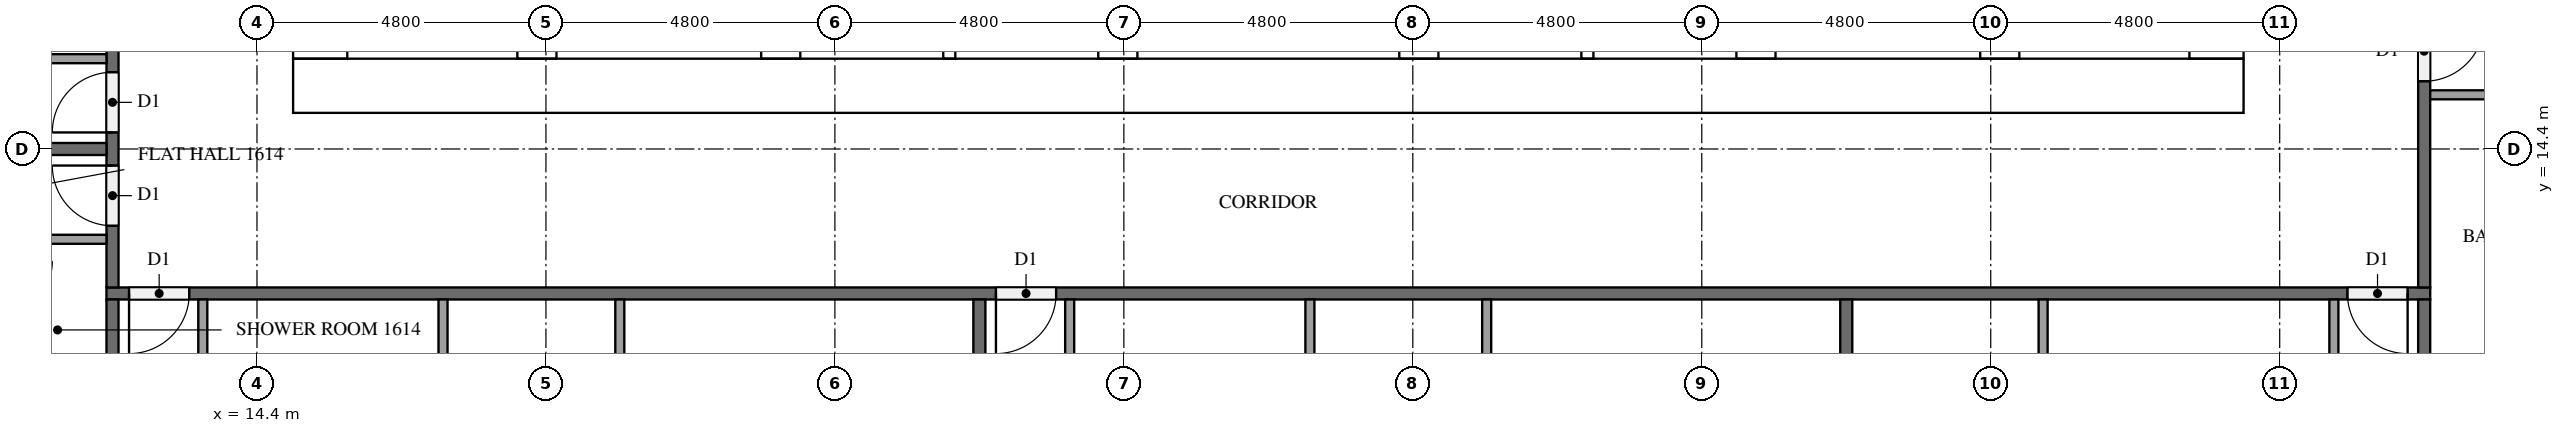
"""IFC4 building model, lengths in metres.
Left out: names, types, materials, properties, quantities, classifications, styles, units other than length and angle.
Written with IfcOpenShell. Run it as: python <this file> out.ifc"""

import sys

from ifc_helpers import new_model, si_unit, direction, frame, frame_2d, origin, place, context, subcontext, project, spatial, rectangle, extrude, element, fill, save


model = new_model("IFC4")
c1 = context("Model", 3, precision=1e-05, world=origin(), true_north=direction((0.0, 1.0)))
c2 = subcontext(c1, "Body", "Model", "MODEL_VIEW")
j1 = project(units=[si_unit("LENGTHUNIT", "METRE"), si_unit("PLANEANGLEUNIT", "RADIAN")], contexts=[c1])
p1 = place(None, origin())
s1 = spatial("IfcSite", under=j1, at=p1, CompositionType="ELEMENT")
p2 = place(p1, origin())
s2 = spatial("IfcBuilding", under=s1, at=p2, CompositionType="ELEMENT")
p3 = place(p2, frame((0.0, 0.0, 66.3)))
s3 = spatial("IfcBuildingStorey", under=s2, at=p3, CompositionType="ELEMENT", Elevation=66.3)
p4 = place(p3, frame((15.0, 15.45, 0.0), z_axis=(0.0, 0.0, 1.0), x_axis=(1.0, 0.0, 0.0)))
e1 = element("IfcWall", 1, at=p4, inside=s3, PredefinedType="SHEAR", context=c2, shape_type="SweptSolid", body=[
    extrude(rectangle(XDim=32.4, YDim=0.9, at=frame_2d((16.2, 0.0))), origin(), (0.0, 0.0, 1.0), 3.2),
])
p5 = place(p4, frame((15.3, 0.0, 0.0)))
e2 = element("IfcOpeningElement", 2, at=p5, cuts=e1, PredefinedType="OPENING", context=c2, shape_type="SweptSolid", body=[
    extrude(rectangle(XDim=1.8, YDim=2.1, at=frame_2d((0.9, 1.05))), frame((0.0, 0.46, 0.0), z_axis=(0.0, -1.0, 0.0), x_axis=(1.0, 0.0, 0.0)), (0.0, 0.0, 1.0), 0.92),
])
p6 = place(p3, frame((15.45, 15.9, 0.0), z_axis=(0.0, 0.0, 1.0), x_axis=(0.0, 1.0, 0.0)))
e3 = element("IfcWall", 3, at=p6, inside=s3, PredefinedType="SHEAR", context=c2, shape_type="SweptSolid", body=[
    extrude(rectangle(XDim=21.0, YDim=0.9, at=frame_2d((10.5, 0.0))), origin(), (0.0, 0.0, 1.0), 3.2),
])
p7 = place(p6, frame((4.86, 0.0, 0.0)))
e4 = element("IfcOpeningElement", 4, at=p7, cuts=e3, PredefinedType="OPENING", context=c2, shape_type="SweptSolid", body=[
    extrude(rectangle(XDim=1.2, YDim=2.1, at=frame_2d((0.6, 1.05))), frame((0.0, 0.46, 0.0), z_axis=(0.0, -1.0, 0.0), x_axis=(1.0, 0.0, 0.0)), (0.0, 0.0, 1.0), 0.92),
])
p8 = place(p3, frame((46.95, 15.9, 0.0), z_axis=(0.0, 0.0, 1.0), x_axis=(0.0, 1.0, 0.0)))
e5 = element("IfcWall", 5, at=p8, inside=s3, PredefinedType="SHEAR", context=c2, shape_type="SweptSolid", body=[
    extrude(rectangle(XDim=21.0, YDim=0.9, at=frame_2d((10.5, 0.0))), origin(), (0.0, 0.0, 1.0), 3.2),
])
p9 = place(p8, frame((10.2, 0.0, 0.0)))
e6 = element("IfcOpeningElement", 6, at=p9, cuts=e5, PredefinedType="OPENING", context=c2, shape_type="SweptSolid", body=[
    extrude(rectangle(XDim=1.2, YDim=2.1, at=frame_2d((0.6, 1.05))), frame((0.0, 0.46, 0.0), z_axis=(0.0, -1.0, 0.0), x_axis=(1.0, 0.0, 0.0)), (0.0, 0.0, 1.0), 0.92),
])
p10 = place(p3, frame((19.05, 15.9, 0.0), z_axis=(0.0, 0.0, 1.0), x_axis=(0.0, 1.0, 0.0)))
e7 = element("IfcWall", 7, at=p10, inside=s3, PredefinedType="SHEAR", context=c2, shape_type="SweptSolid", body=[
    extrude(rectangle(XDim=15.025, YDim=0.65, at=frame_2d((7.513, 0.0))), origin(), (0.0, 0.0, 1.0), 3.2),
])
p11 = place(p10, frame((9.55, 0.0, 0.0)))
e8 = element("IfcOpeningElement", 8, at=p11, cuts=e7, PredefinedType="OPENING", context=c2, shape_type="SweptSolid", body=[
    extrude(rectangle(XDim=1.1, YDim=2.1, at=frame_2d((0.55, 1.05))), frame((0.0, 0.335, 0.0), z_axis=(0.0, -1.0, 0.0), x_axis=(1.0, 0.0, 0.0)), (0.0, 0.0, 1.0), 0.67),
])
p12 = place(p10, frame((13.05, 0.0, 0.0)))
e9 = element("IfcOpeningElement", 9, at=p12, cuts=e7, PredefinedType="OPENING", context=c2, shape_type="SweptSolid", body=[
    extrude(rectangle(XDim=1.1, YDim=2.1, at=frame_2d((0.55, 1.05))), frame((0.0, 0.335, 0.0), z_axis=(0.0, -1.0, 0.0), x_axis=(1.0, 0.0, 0.0)), (0.0, 0.0, 1.0), 0.67),
])
p13 = place(p10, frame((0.3, 0.0, 0.0)))
e10 = element("IfcOpeningElement", 10, at=p13, cuts=e7, PredefinedType="OPENING", context=c2, shape_type="SweptSolid", body=[
    extrude(rectangle(XDim=1.2, YDim=2.1, at=frame_2d((0.6, 1.05))), frame((0.0, 0.335, 0.0), z_axis=(0.0, -1.0, 0.0), x_axis=(1.0, 0.0, 0.0)), (0.0, 0.0, 1.0), 0.67),
])
p14 = place(p3, frame((23.1, 15.9, 0.0), z_axis=(0.0, 0.0, 1.0), x_axis=(0.0, 1.0, 0.0)))
e11 = element("IfcWall", 11, at=p14, inside=s3, PredefinedType="SHEAR", context=c2, shape_type="SweptSolid", body=[
    extrude(rectangle(XDim=21.0, YDim=0.65, at=frame_2d((10.5, 0.0))), origin(), (0.0, 0.0, 1.0), 3.2),
])
p15 = place(p3, frame((39.3, 15.9, 0.0), z_axis=(0.0, 0.0, 1.0), x_axis=(0.0, 1.0, 0.0)))
e12 = element("IfcWall", 12, at=p15, inside=s3, PredefinedType="SHEAR", context=c2, shape_type="SweptSolid", body=[
    extrude(rectangle(XDim=8.35, YDim=0.65, at=frame_2d((4.175, 0.0))), origin(), (0.0, 0.0, 1.0), 3.2),
])
p16 = place(p3, frame((43.35, 15.9, 0.0), z_axis=(0.0, 0.0, 1.0), x_axis=(0.0, 1.0, 0.0)))
e13 = element("IfcWall", 13, at=p16, inside=s3, PredefinedType="SHEAR", context=c2, shape_type="SweptSolid", body=[
    extrude(rectangle(XDim=8.35, YDim=0.65, at=frame_2d((4.175, 0.0))), origin(), (0.0, 0.0, 1.0), 3.2),
])
p17 = place(p16, frame((0.3, 0.0, 0.0)))
e14 = element("IfcOpeningElement", 14, at=p17, cuts=e13, PredefinedType="OPENING", context=c2, shape_type="SweptSolid", body=[
    extrude(rectangle(XDim=1.2, YDim=2.1, at=frame_2d((0.6, 1.05))), frame((0.0, 0.335, 0.0), z_axis=(0.0, -1.0, 0.0), x_axis=(1.0, 0.0, 0.0)), (0.0, 0.0, 1.0), 0.67),
])
for number, where, z_axis, x_axis in (
    (15, (28.7, 15.9, 0.0), (0.0, 0.0, 1.0), (0.0, 1.0, 0.0)),
    (16, (33.7, 15.9, 0.0), (0.0, 0.0, 1.0), (0.0, 1.0, 0.0)),
):
    element("IfcWall", number, at=place(p3, frame(where, z_axis=z_axis, x_axis=x_axis)), inside=s3, PredefinedType="SHEAR", context=c2, shape_type="SweptSolid", body=[
        extrude(rectangle(XDim=2.525, YDim=0.65, at=frame_2d((1.263, 0.0))), origin(), (0.0, 0.0, 1.0), 3.2),
    ])
for number, where, z_axis, x_axis in (
    (17, (25.9, 15.9, 0.0), (0.0, 0.0, 1.0), (0.0, 1.0, 0.0)),
    (18, (36.5, 15.9, 0.0), (0.0, 0.0, 1.0), (0.0, 1.0, 0.0)),
):
    element("IfcWall", number, at=place(p3, frame(where, z_axis=z_axis, x_axis=x_axis)), inside=s3, PredefinedType="SOLIDWALL", context=c2, shape_type="SweptSolid", body=[
        extrude(rectangle(XDim=2.525, YDim=0.2, at=frame_2d((1.263, 0.0))), origin(), (0.0, 0.0, 1.0), 3.2),
    ])
p18 = place(p3, frame((50.5, 12.0, 0.0), z_axis=(0.0, 0.0, 1.0), x_axis=(-1.0, 0.0, 0.0)))
e19 = element("IfcWall", 19, at=p18, inside=s3, PredefinedType="PARTITIONING", context=c2, shape_type="SweptSolid", body=[
    extrude(rectangle(XDim=38.6, YDim=0.2, at=frame_2d((19.3, 0.0))), origin(), (0.0, 0.0, 1.0), 3.2),
])
p19 = place(p18, frame((37.225, 0.0, 0.0)))
e20 = element("IfcOpeningElement", 20, at=p19, cuts=e19, PredefinedType="OPENING", context=c2, shape_type="SweptSolid", body=[
    extrude(rectangle(XDim=1.0, YDim=2.1, at=frame_2d((0.5, 1.05))), frame((0.0, 0.11, 0.0), z_axis=(0.0, -1.0, 0.0), x_axis=(1.0, 0.0, 0.0)), (0.0, 0.0, 1.0), 0.22),
])
p20 = place(p18, frame((22.825, 0.0, 0.0)))
e21 = element("IfcOpeningElement", 21, at=p20, cuts=e19, PredefinedType="OPENING", context=c2, shape_type="SweptSolid", body=[
    extrude(rectangle(XDim=1.0, YDim=2.1, at=frame_2d((0.5, 1.05))), frame((0.0, 0.11, 0.0), z_axis=(0.0, -1.0, 0.0), x_axis=(1.0, 0.0, 0.0)), (0.0, 0.0, 1.0), 0.22),
])
p21 = place(p18, frame((0.375, 0.0, 0.0)))
e22 = element("IfcOpeningElement", 22, at=p21, cuts=e19, PredefinedType="OPENING", context=c2, shape_type="SweptSolid", body=[
    extrude(rectangle(XDim=1.0, YDim=2.1, at=frame_2d((0.5, 1.05))), frame((0.0, 0.11, 0.0), z_axis=(0.0, -1.0, 0.0), x_axis=(1.0, 0.0, 0.0)), (0.0, 0.0, 1.0), 0.22),
])
p22 = place(p3, frame((50.4, 40.7, 0.0), z_axis=(0.0, 0.0, 1.0), x_axis=(0.0, -1.0, 0.0)))
e23 = element("IfcWall", 23, at=p22, inside=s3, PredefinedType="PARTITIONING", context=c2, shape_type="SweptSolid", body=[
    extrude(rectangle(XDim=28.6, YDim=0.2, at=frame_2d((14.3, 0.0))), origin(), (0.0, 0.0, 1.0), 3.2),
])
p23 = place(p22, frame((24.175, 0.0, 0.0)))
e24 = element("IfcOpeningElement", 24, at=p23, cuts=e23, PredefinedType="OPENING", context=c2, shape_type="SweptSolid", body=[
    extrude(rectangle(XDim=1.0, YDim=2.1, at=frame_2d((0.5, 1.05))), frame((0.0, 0.11, 0.0), z_axis=(0.0, -1.0, 0.0), x_axis=(1.0, 0.0, 0.0)), (0.0, 0.0, 1.0), 0.22),
])
p24 = place(p22, frame((22.625, 0.0, 0.0)))
e25 = element("IfcOpeningElement", 25, at=p24, cuts=e23, PredefinedType="OPENING", context=c2, shape_type="SweptSolid", body=[
    extrude(rectangle(XDim=1.0, YDim=2.1, at=frame_2d((0.5, 1.05))), frame((0.0, 0.11, 0.0), z_axis=(0.0, -1.0, 0.0), x_axis=(1.0, 0.0, 0.0)), (0.0, 0.0, 1.0), 0.22),
])
p25 = place(p22, frame((10.625, 0.0, 0.0)))
e26 = element("IfcOpeningElement", 26, at=p25, cuts=e23, PredefinedType="OPENING", context=c2, shape_type="SweptSolid", body=[
    extrude(rectangle(XDim=1.0, YDim=2.1, at=frame_2d((0.5, 1.05))), frame((0.0, 0.11, 0.0), z_axis=(0.0, -1.0, 0.0), x_axis=(1.0, 0.0, 0.0)), (0.0, 0.0, 1.0), 0.22),
])
p26 = place(p3, frame((12.0, 12.1, 0.0), z_axis=(0.0, 0.0, 1.0), x_axis=(0.0, 1.0, 0.0)))
e27 = element("IfcWall", 27, at=p26, inside=s3, PredefinedType="PARTITIONING", context=c2, shape_type="SweptSolid", body=[
    extrude(rectangle(XDim=28.6, YDim=0.2, at=frame_2d((14.3, 0.0))), origin(), (0.0, 0.0, 1.0), 3.2),
])
p27 = place(p26, frame((19.375, 0.0, 0.0)))
e28 = element("IfcOpeningElement", 28, at=p27, cuts=e27, PredefinedType="OPENING", context=c2, shape_type="SweptSolid", body=[
    extrude(rectangle(XDim=1.0, YDim=2.1, at=frame_2d((0.5, 1.05))), frame((0.0, 0.11, 0.0), z_axis=(0.0, -1.0, 0.0), x_axis=(1.0, 0.0, 0.0)), (0.0, 0.0, 1.0), 0.22),
])
p28 = place(p26, frame((12.175, 0.0, 0.0)))
e29 = element("IfcOpeningElement", 29, at=p28, cuts=e27, PredefinedType="OPENING", context=c2, shape_type="SweptSolid", body=[
    extrude(rectangle(XDim=1.0, YDim=2.1, at=frame_2d((0.5, 1.05))), frame((0.0, 0.11, 0.0), z_axis=(0.0, -1.0, 0.0), x_axis=(1.0, 0.0, 0.0)), (0.0, 0.0, 1.0), 0.22),
])
p29 = place(p26, frame((2.575, 0.0, 0.0)))
e30 = element("IfcOpeningElement", 30, at=p29, cuts=e27, PredefinedType="OPENING", context=c2, shape_type="SweptSolid", body=[
    extrude(rectangle(XDim=1.0, YDim=2.1, at=frame_2d((0.5, 1.05))), frame((0.0, 0.11, 0.0), z_axis=(0.0, -1.0, 0.0), x_axis=(1.0, 0.0, 0.0)), (0.0, 0.0, 1.0), 0.22),
])
p30 = place(p26, frame((1.025, 0.0, 0.0)))
e31 = element("IfcOpeningElement", 31, at=p30, cuts=e27, PredefinedType="OPENING", context=c2, shape_type="SweptSolid", body=[
    extrude(rectangle(XDim=1.0, YDim=2.1, at=frame_2d((0.5, 1.05))), frame((0.0, 0.11, 0.0), z_axis=(0.0, -1.0, 0.0), x_axis=(1.0, 0.0, 0.0)), (0.0, 0.0, 1.0), 0.22),
])
for number, where, z_axis, x_axis in (
    (32, (26.4, 11.9, 0.0), (0.0, 0.0, 1.0), (0.0, -1.0, 0.0)),
    (33, (12.0, 0.1, 0.0), (0.0, 0.0, 1.0), (0.0, 1.0, 0.0)),
    (34, (40.8, 11.9, 0.0), (0.0, 0.0, 1.0), (0.0, -1.0, 0.0)),
    (35, (50.4, 11.9, 0.0), (0.0, 0.0, 1.0), (0.0, -1.0, 0.0)),
):
    element("IfcWall", number, at=place(p3, frame(where, z_axis=z_axis, x_axis=x_axis)), inside=s3, PredefinedType="PARTITIONING", context=c2, shape_type="SweptSolid", body=[
        extrude(rectangle(XDim=11.8, YDim=0.2, at=frame_2d((5.9, 0.0))), origin(), (0.0, 0.0, 1.0), 3.2),
    ])
p31 = place(p3, frame((5.225, 14.4, 0.0), z_axis=(0.0, 0.0, 1.0), x_axis=(1.0, 0.0, 0.0)))
e36 = element("IfcWall", 36, at=p31, inside=s3, PredefinedType="PARTITIONING", context=c2, shape_type="SweptSolid", body=[
    extrude(rectangle(XDim=6.675, YDim=0.2, at=frame_2d((3.337, 0.0))), origin(), (0.0, 0.0, 1.0), 3.2),
])
for number, where, z_axis, x_axis in (
    (37, (17.49, 11.9, 0.0), (0.0, 0.0, 1.0), (0.0, -1.0, 0.0)),
    (38, (20.427, 11.9, 0.0), (0.0, 0.0, 1.0), (0.0, -1.0, 0.0)),
):
    element("IfcWall", number, at=place(p3, frame(where, z_axis=z_axis, x_axis=x_axis)), inside=s3, PredefinedType="PARTITIONING", context=c2, shape_type="SweptSolid", body=[
        extrude(rectangle(XDim=4.325, YDim=0.15, at=frame_2d((2.163, 0.0))), origin(), (0.0, 0.0, 1.0), 3.2),
    ])
p32 = place(p3, frame((13.5, 11.9, 0.0), z_axis=(0.0, 0.0, 1.0), x_axis=(0.0, -1.0, 0.0)))
e39 = element("IfcWall", 39, at=p32, inside=s3, PredefinedType="PARTITIONING", context=c2, shape_type="SweptSolid", body=[
    extrude(rectangle(XDim=4.475, YDim=0.15, at=frame_2d((2.237, 0.0))), origin(), (0.0, 0.0, 1.0), 3.2),
])
for number, where, z_axis, x_axis in (
    (40, (31.89, 11.9, 0.0), (0.0, 0.0, 1.0), (0.0, -1.0, 0.0)),
    (41, (34.827, 11.9, 0.0), (0.0, 0.0, 1.0), (0.0, -1.0, 0.0)),
):
    element("IfcWall", number, at=place(p3, frame(where, z_axis=z_axis, x_axis=x_axis)), inside=s3, PredefinedType="PARTITIONING", context=c2, shape_type="SweptSolid", body=[
        extrude(rectangle(XDim=3.125, YDim=0.15, at=frame_2d((1.562, 0.0))), origin(), (0.0, 0.0, 1.0), 3.2),
    ])
p33 = place(p3, frame((27.9, 11.9, 0.0), z_axis=(0.0, 0.0, 1.0), x_axis=(0.0, -1.0, 0.0)))
e42 = element("IfcWall", 42, at=p33, inside=s3, PredefinedType="PARTITIONING", context=c2, shape_type="SweptSolid", body=[
    extrude(rectangle(XDim=3.275, YDim=0.15, at=frame_2d((1.637, 0.0))), origin(), (0.0, 0.0, 1.0), 3.2),
])
p34 = place(p3, frame((44.07, 11.9, 0.0), z_axis=(0.0, 0.0, 1.0), x_axis=(0.0, -1.0, 0.0)))
e43 = element("IfcWall", 43, at=p34, inside=s3, PredefinedType="PARTITIONING", context=c2, shape_type="SweptSolid", body=[
    extrude(rectangle(XDim=3.575, YDim=0.15, at=frame_2d((1.788, 0.0))), origin(), (0.0, 0.0, 1.0), 3.2),
])
p35 = place(p3, frame((48.9, 11.9, 0.0), z_axis=(0.0, 0.0, 1.0), x_axis=(0.0, -1.0, 0.0)))
e44 = element("IfcWall", 44, at=p35, inside=s3, PredefinedType="PARTITIONING", context=c2, shape_type="SweptSolid", body=[
    extrude(rectangle(XDim=3.725, YDim=0.15, at=frame_2d((1.862, 0.0))), origin(), (0.0, 0.0, 1.0), 3.2),
])
p36 = place(p3, frame((50.5, 15.3, 0.0), z_axis=(0.0, 0.0, 1.0), x_axis=(1.0, 0.0, 0.0)))
e45 = element("IfcWall", 45, at=p36, inside=s3, PredefinedType="PARTITIONING", context=c2, shape_type="SweptSolid", body=[
    extrude(rectangle(XDim=3.725, YDim=0.15, at=frame_2d((1.863, 0.0))), origin(), (0.0, 0.0, 1.0), 3.2),
])
p37 = place(p3, frame((11.9, 15.9, 0.0), z_axis=(0.0, 0.0, 1.0), x_axis=(-1.0, 0.0, 0.0)))
e46 = element("IfcWall", 46, at=p37, inside=s3, PredefinedType="PARTITIONING", context=c2, shape_type="SweptSolid", body=[
    extrude(rectangle(XDim=1.925, YDim=0.15, at=frame_2d((0.962, 0.0))), origin(), (0.0, 0.0, 1.0), 3.2),
])
p38 = place(p3, frame((11.9, 12.9, 0.0), z_axis=(0.0, 0.0, 1.0), x_axis=(-1.0, 0.0, 0.0)))
e47 = element("IfcWall", 47, at=p38, inside=s3, PredefinedType="PARTITIONING", context=c2, shape_type="SweptSolid", body=[
    extrude(rectangle(XDim=1.775, YDim=0.15, at=frame_2d((0.887, 0.0))), origin(), (0.0, 0.0, 1.0), 3.2),
])
p39 = place(p5, frame((1.8, 0.0, 0.0), z_axis=(0.0, 0.0, 1.0), x_axis=(-1.0, 0.0, 0.0)))
e48 = element("IfcDoor", 48, at=p39, inside=s3, OperationType="DOUBLE_DOOR_SINGLE_SWING", PredefinedType="DOOR", context=c2, shape_type="SweptSolid", body=[
    extrude(rectangle(XDim=1.8, YDim=2.1, at=frame_2d((0.9, 1.05))), frame((0.0, 0.025, 0.0), z_axis=(0.0, -1.0, 0.0), x_axis=(1.0, 0.0, 0.0)), (0.0, 0.0, 1.0), 0.05),
])
fill(e2, e48)
p40 = place(p19, origin())
e49 = element("IfcDoor", 49, at=p40, inside=s3, OperationType="SINGLE_SWING_RIGHT", PredefinedType="DOOR", context=c2, shape_type="SweptSolid", body=[
    extrude(rectangle(XDim=1.0, YDim=2.1, at=frame_2d((0.5, 1.05))), frame((0.0, 0.025, 0.0), z_axis=(0.0, -1.0, 0.0), x_axis=(1.0, 0.0, 0.0)), (0.0, 0.0, 1.0), 0.05),
])
fill(e20, e49)
p41 = place(p20, origin())
e50 = element("IfcDoor", 50, at=p41, inside=s3, OperationType="SINGLE_SWING_RIGHT", PredefinedType="DOOR", context=c2, shape_type="SweptSolid", body=[
    extrude(rectangle(XDim=1.0, YDim=2.1, at=frame_2d((0.5, 1.05))), frame((0.0, 0.025, 0.0), z_axis=(0.0, -1.0, 0.0), x_axis=(1.0, 0.0, 0.0)), (0.0, 0.0, 1.0), 0.05),
])
fill(e21, e50)
p42 = place(p21, origin())
e51 = element("IfcDoor", 51, at=p42, inside=s3, OperationType="SINGLE_SWING_LEFT", PredefinedType="DOOR", context=c2, shape_type="SweptSolid", body=[
    extrude(rectangle(XDim=1.0, YDim=2.1, at=frame_2d((0.5, 1.05))), frame((0.0, 0.025, 0.0), z_axis=(0.0, -1.0, 0.0), x_axis=(1.0, 0.0, 0.0)), (0.0, 0.0, 1.0), 0.05),
])
fill(e22, e51)
p43 = place(p23, origin())
e52 = element("IfcDoor", 52, at=p43, inside=s3, OperationType="SINGLE_SWING_LEFT", PredefinedType="DOOR", context=c2, shape_type="SweptSolid", body=[
    extrude(rectangle(XDim=1.0, YDim=2.1, at=frame_2d((0.5, 1.05))), frame((0.0, 0.025, 0.0), z_axis=(0.0, -1.0, 0.0), x_axis=(1.0, 0.0, 0.0)), (0.0, 0.0, 1.0), 0.05),
])
fill(e24, e52)
p44 = place(p29, origin())
e53 = element("IfcDoor", 53, at=p44, inside=s3, OperationType="SINGLE_SWING_LEFT", PredefinedType="DOOR", context=c2, shape_type="SweptSolid", body=[
    extrude(rectangle(XDim=1.0, YDim=2.1, at=frame_2d((0.5, 1.05))), frame((0.0, 0.025, 0.0), z_axis=(0.0, -1.0, 0.0), x_axis=(1.0, 0.0, 0.0)), (0.0, 0.0, 1.0), 0.05),
])
fill(e30, e53)
p45 = place(p30, origin())
e54 = element("IfcDoor", 54, at=p45, inside=s3, OperationType="SINGLE_SWING_RIGHT", PredefinedType="DOOR", context=c2, shape_type="SweptSolid", body=[
    extrude(rectangle(XDim=1.0, YDim=2.1, at=frame_2d((0.5, 1.05))), frame((0.0, 0.025, 0.0), z_axis=(0.0, -1.0, 0.0), x_axis=(1.0, 0.0, 0.0)), (0.0, 0.0, 1.0), 0.05),
])
fill(e31, e54)
save(model, sys.argv[1])
